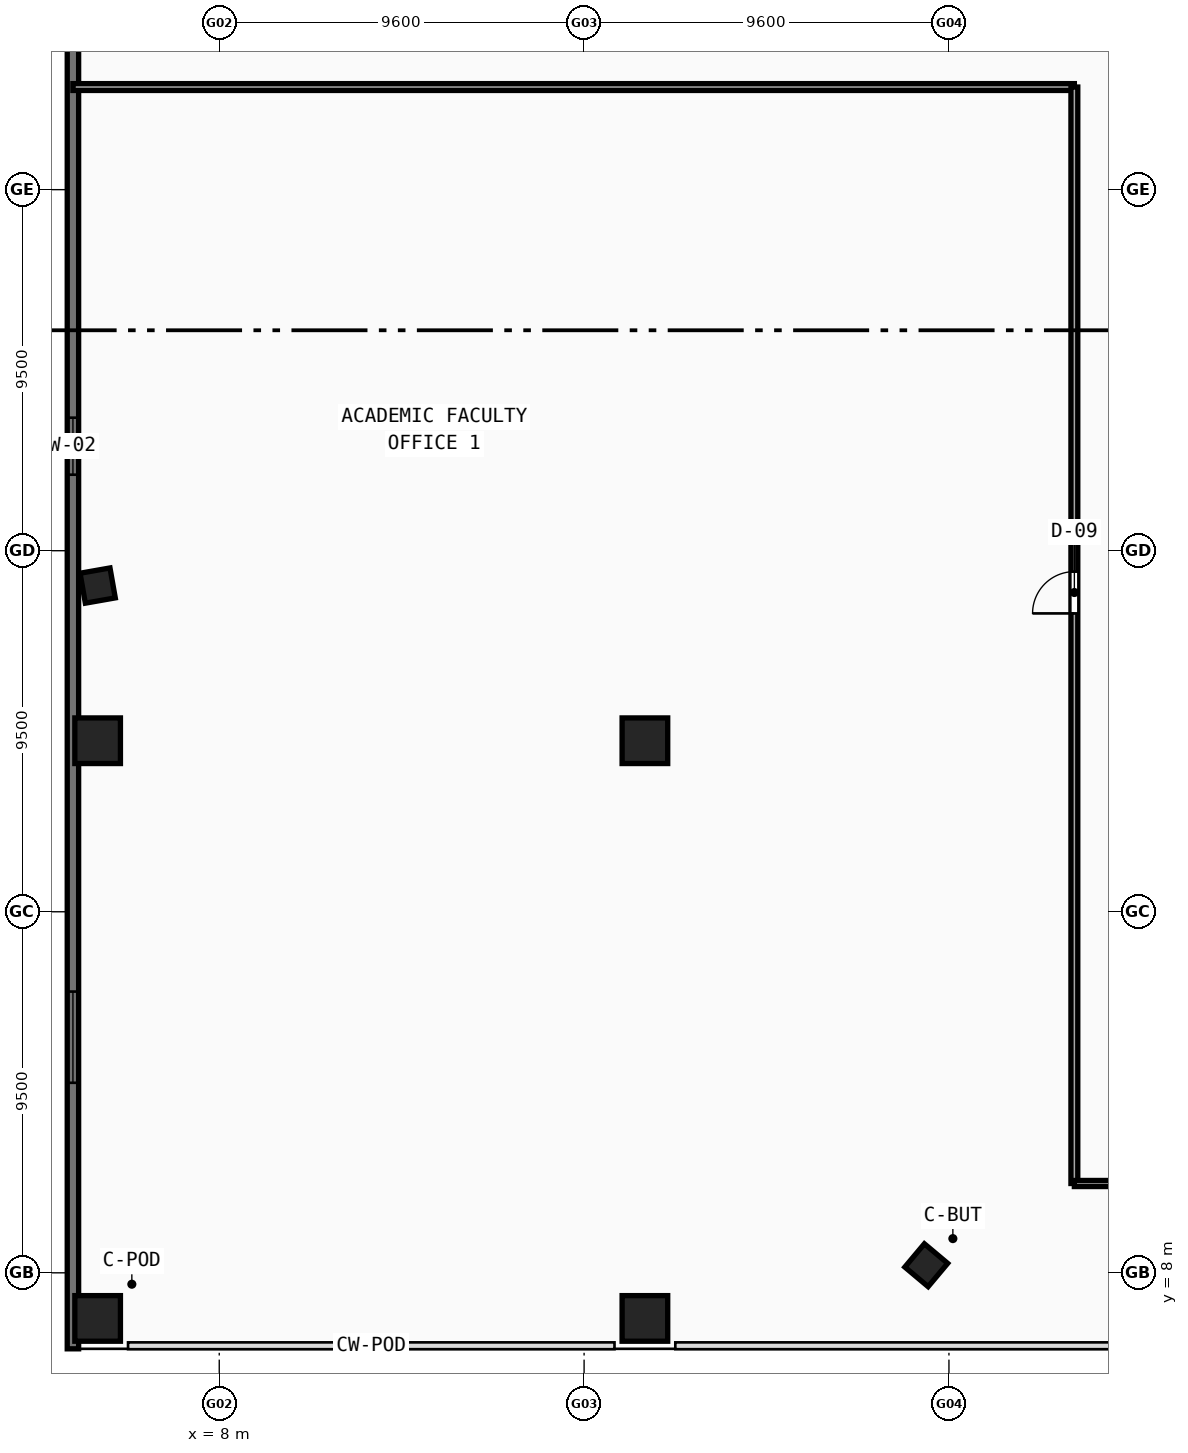
"""IFC4 building model, lengths in metres.
Left out: names, types, materials, properties, quantities, classifications, styles, units other than length and angle.
Written with IfcOpenShell. Run it as: python <this file> out.ifc"""

import sys

from ifc_helpers import new_model, si_unit, direction, frame, frame_2d, origin, origin_with_axes, origin_2d, place, context, subcontext, project, spatial, rectangle, hollow_rectangle, extrude, source, transform, mapped, element, fill, save


model = new_model("IFC4")
c1 = context("Model", 3, precision=1e-05, world=origin(), true_north=direction((0.0, 1.0)))
c2 = subcontext(c1, "Body", "Model", "MODEL_VIEW")
j1 = project(units=[si_unit("LENGTHUNIT", "METRE"), si_unit("PLANEANGLEUNIT", "RADIAN")], contexts=[c1])
p1 = place(None, origin())
s1 = spatial("IfcSite", under=j1, at=p1, CompositionType="ELEMENT")
p2 = place(p1, origin())
s2 = spatial("IfcBuilding", under=s1, at=p2, CompositionType="ELEMENT")
p3 = place(p2, frame((0.0, 0.0, 9.6)))
s3 = spatial("IfcBuildingStorey", under=s2, at=p3, CompositionType="ELEMENT", Elevation=9.6)
m1 = source(origin(), c2, "Body", "SweptSolid", [
    extrude(hollow_rectangle(XDim=1.2, YDim=1.2, WallThickness=0.05, at=origin_2d()), origin(), (0.0, 0.0, 1.0), 4.8),
])
for number, where, z_axis, x_axis in (
    (1, (4.8, 6.8, -0.28), (0.0, 0.0, 1.0), (1.0, 0.0, 0.0)),
    (2, (4.8, 22.0, -0.28), (0.0, 0.0, 1.0), (1.0, 0.0, 0.0)),
    (3, (19.2, 6.8, -0.28), (0.0, 0.0, 1.0), (1.0, 0.0, 0.0)),
    (4, (19.2, 22.0, -0.28), (0.0, 0.0, 1.0), (1.0, 0.0, 0.0)),
):
    element("IfcColumn", number, at=place(p3, frame(where, z_axis=z_axis, x_axis=x_axis)), inside=s3, PredefinedType="COLUMN", context=c2, shape_type="MappedRepresentation", body=[
        mapped(m1, transform((0.0, 0.0, 0.0), scale=1.0)),
    ])
m2 = source(origin(), c2, "Body", "SweptSolid", [
    extrude(hollow_rectangle(XDim=0.8, YDim=0.8, WallThickness=0.032, at=origin_2d()), origin(), (0.0, 0.0, 1.0), 4.8),
])
for number, where, z_axis, x_axis in (
    (5, (26.603, 8.2, -0.28), (0.0, 0.0, 1.0), (0.766, -0.643, 0.0)),
    (6, (4.801, 26.083, -0.28), (0.0, 0.0, 1.0), (0.174, -0.985, 0.0)),
):
    element("IfcColumn", number, at=place(p3, frame(where, z_axis=z_axis, x_axis=x_axis)), inside=s3, PredefinedType="COLUMN", context=c2, shape_type="MappedRepresentation", body=[
        mapped(m2, transform((0.0, 0.0, 0.0), scale=1.0)),
    ])
p4 = place(p3, frame((4.15, 6.0, 0.0), z_axis=(0.0, 0.0, 1.0), x_axis=(0.0, 1.0, 0.0)))
e7 = element("IfcWall", 7, at=p4, inside=s3, PredefinedType="STANDARD", context=c2, shape_type="SweptSolid", body=[
    extrude(rectangle(XDim=76.0, YDim=0.3, at=frame_2d((38.0, 0.0))), origin(), (0.0, 0.0, 1.0), 4.52),
])
p5 = place(p4, frame((7.0, 0.0, 0.9)))
e8 = element("IfcOpeningElement", 8, at=p5, cuts=e7, PredefinedType="OPENING", context=c2, shape_type="SweptSolid", body=[
    extrude(rectangle(XDim=2.4, YDim=1.8, at=frame_2d((1.2, 0.9))), frame((0.0, 0.16, 0.0), z_axis=(0.0, -1.0, 0.0), x_axis=(1.0, 0.0, 0.0)), (0.0, 0.0, 1.0), 0.32),
])
p6 = place(p4, frame((23.0, 0.0, 0.9)))
e9 = element("IfcOpeningElement", 9, at=p6, cuts=e7, PredefinedType="OPENING", context=c2, shape_type="SweptSolid", body=[
    extrude(rectangle(XDim=1.5, YDim=1.6, at=frame_2d((0.75, 0.8))), frame((0.0, 0.16, 0.0), z_axis=(0.0, -1.0, 0.0), x_axis=(1.0, 0.0, 0.0)), (0.0, 0.0, 1.0), 0.32),
])
p7 = place(p4, frame((43.0, 0.0, 0.9)))
e10 = element("IfcOpeningElement", 10, at=p7, cuts=e7, PredefinedType="OPENING", context=c2, shape_type="SweptSolid", body=[
    extrude(rectangle(XDim=2.4, YDim=1.8, at=frame_2d((1.2, 0.9))), frame((0.0, 0.16, 0.0), z_axis=(0.0, -1.0, 0.0), x_axis=(1.0, 0.0, 0.0)), (0.0, 0.0, 1.0), 0.32),
])
p8 = place(p4, frame((63.0, 0.0, 0.9)))
e11 = element("IfcOpeningElement", 11, at=p8, cuts=e7, PredefinedType="OPENING", context=c2, shape_type="SweptSolid", body=[
    extrude(rectangle(XDim=1.5, YDim=1.6, at=frame_2d((0.75, 0.8))), frame((0.0, 0.16, 0.0), z_axis=(0.0, -1.0, 0.0), x_axis=(1.0, 0.0, 0.0)), (0.0, 0.0, 1.0), 0.32),
])
p9 = place(p3, frame((4.15, 39.2, 0.0), z_axis=(0.0, 0.0, 1.0), x_axis=(1.0, 0.0, 0.0)))
e12 = element("IfcWall", 12, at=p9, inside=s3, PredefinedType="PARTITIONING", context=c2, shape_type="SweptSolid", body=[
    extrude(rectangle(XDim=26.35, YDim=0.18, at=frame_2d((13.175, 0.0))), origin(), (0.0, 0.0, 1.0), 3.62),
])
p10 = place(p3, frame((30.5, 10.35, 0.0), z_axis=(0.0, 0.0, 1.0), x_axis=(0.0, 1.0, 0.0)))
e13 = element("IfcWall", 13, at=p10, inside=s3, PredefinedType="PARTITIONING", context=c2, shape_type="SweptSolid", body=[
    extrude(rectangle(XDim=28.85, YDim=0.18, at=frame_2d((14.425, 0.0))), origin(), (0.0, 0.0, 1.0), 3.62),
])
p11 = place(p10, frame((15.0, 0.0, 0.0)))
e14 = element("IfcOpeningElement", 14, at=p11, cuts=e13, PredefinedType="OPENING", context=c2, shape_type="SweptSolid", body=[
    extrude(rectangle(XDim=1.1, YDim=2.15, at=frame_2d((0.55, 1.075))), frame((0.0, 0.1, 0.0), z_axis=(0.0, -1.0, 0.0), x_axis=(1.0, 0.0, 0.0)), (0.0, 0.0, 1.0), 0.2),
])
p12 = place(p3, frame((30.5, 10.35, 0.0), z_axis=(0.0, 0.0, 1.0), x_axis=(1.0, 0.0, 0.0)))
e15 = element("IfcWall", 15, at=p12, inside=s3, PredefinedType="PARTITIONING", context=c2, shape_type="SweptSolid", body=[
    extrude(rectangle(XDim=35.0, YDim=0.16, at=frame_2d((17.5, 0.0))), origin(), (0.0, 0.0, 1.0), 3.62),
])
m3 = source(origin(), c2, "Body", "SweptSolid", [
    extrude(rectangle(XDim=2.4, YDim=1.8, at=frame_2d((1.2, 0.9))), frame((0.0, 0.03, 0.0), z_axis=(0.0, -1.0, 0.0), x_axis=(1.0, 0.0, 0.0)), (0.0, 0.0, 1.0), 0.06),
])
p13 = place(p5, origin_with_axes())
e16 = element("IfcWindow", 16, at=p13, inside=s3, PartitioningType="SINGLE_PANEL", PredefinedType="WINDOW", context=c2, shape_type="MappedRepresentation", body=[
    mapped(m3, transform((0.0, 0.0, 0.0), scale=1.0)),
])
fill(e8, e16)
m4 = source(origin(), c2, "Body", "SweptSolid", [
    extrude(rectangle(XDim=1.5, YDim=1.6, at=frame_2d((0.75, 0.8))), frame((0.0, 0.03, 0.0), z_axis=(0.0, -1.0, 0.0), x_axis=(1.0, 0.0, 0.0)), (0.0, 0.0, 1.0), 0.06),
])
p14 = place(p6, origin_with_axes())
e17 = element("IfcWindow", 17, at=p14, inside=s3, PartitioningType="SINGLE_PANEL", PredefinedType="WINDOW", context=c2, shape_type="MappedRepresentation", body=[
    mapped(m4, transform((0.0, 0.0, 0.0), scale=1.0)),
])
fill(e9, e17)
m5 = source(origin(), c2, "Body", "SweptSolid", [
    extrude(rectangle(XDim=1.1, YDim=2.15, at=frame_2d((0.55, 1.075))), frame((0.0, 0.025, 0.0), z_axis=(0.0, -1.0, 0.0), x_axis=(1.0, 0.0, 0.0)), (0.0, 0.0, 1.0), 0.05),
])
p15 = place(p11, origin_with_axes())
e18 = element("IfcDoor", 18, at=p15, inside=s3, OperationType="SINGLE_SWING_LEFT", PredefinedType="DOOR", context=c2, shape_type="MappedRepresentation", body=[
    mapped(m5, transform((0.0, 0.0, 0.0), scale=1.0)),
])
fill(e14, e18)
save(model, sys.argv[1])
